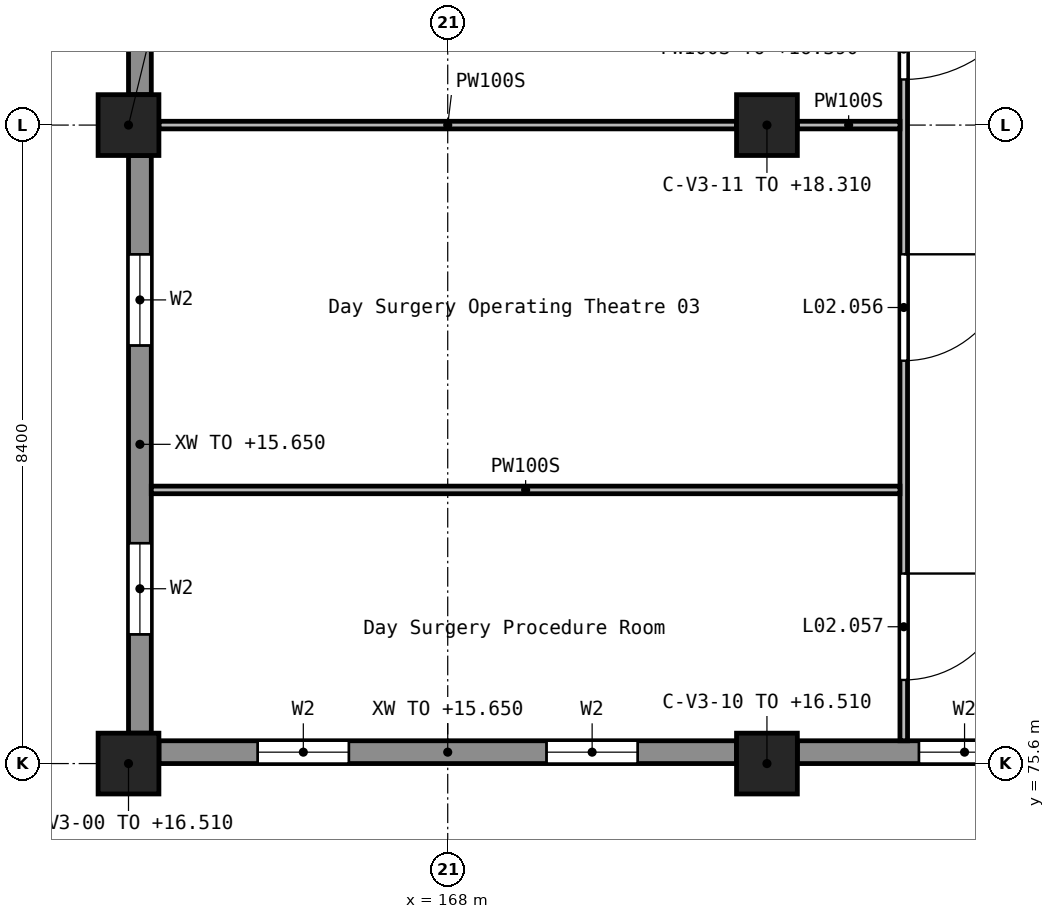
"""IFC4 building model, lengths in metres.
Left out: names, types, materials, properties, quantities, classifications, styles, units other than length and angle.
Written with IfcOpenShell. Run it as: python <this file> out.ifc"""

import sys

from ifc_helpers import new_model, si_unit, direction, frame, frame_2d, origin, origin_2d, place, context, subcontext, project, spatial, rectangle, extrude, element, fill, save


model = new_model("IFC4")
c1 = context("Model", 3, precision=1e-05, world=origin(), true_north=direction((0.0, 1.0)))
c2 = subcontext(c1, "Body", "Model", "MODEL_VIEW")
j1 = project(units=[si_unit("LENGTHUNIT", "METRE"), si_unit("PLANEANGLEUNIT", "RADIAN")], contexts=[c1])
p1 = place(None, origin())
s1 = spatial("IfcSite", under=j1, at=p1, CompositionType="ELEMENT")
p2 = place(p1, origin())
s2 = spatial("IfcBuilding", under=s1, at=p2, CompositionType="ELEMENT")
p3 = place(p2, frame((0.0, 0.0, 12.6)))
s3 = spatial("IfcBuildingStorey", under=s2, at=p3, CompositionType="ELEMENT", Elevation=12.6)
p4 = place(p3, frame((163.8, 75.6, 0.0), z_axis=(0.0, 0.0, 1.0), x_axis=(1.0, 0.0, 0.0)))
e1 = element("IfcColumn", 1, at=p4, inside=s3, PredefinedType="COLUMN", context=c2, shape_type="SweptSolid", body=[
    extrude(rectangle(XDim=0.8, YDim=0.8, at=origin_2d()), origin(), (0.0, 0.0, 1.0), 3.91),
])
p5 = place(p3, frame((163.8, 84.0, 0.0), z_axis=(0.0, 0.0, 1.0), x_axis=(1.0, 0.0, 0.0)))
e2 = element("IfcColumn", 2, at=p5, inside=s3, PredefinedType="COLUMN", context=c2, shape_type="SweptSolid", body=[
    extrude(rectangle(XDim=0.8, YDim=0.8, at=origin_2d()), origin(), (0.0, 0.0, 1.0), 5.71),
])
p6 = place(p3, frame((172.2, 75.6, 0.0), z_axis=(0.0, 0.0, 1.0), x_axis=(1.0, 0.0, 0.0)))
e3 = element("IfcColumn", 3, at=p6, inside=s3, PredefinedType="COLUMN", context=c2, shape_type="SweptSolid", body=[
    extrude(rectangle(XDim=0.8, YDim=0.8, at=origin_2d()), origin(), (0.0, 0.0, 1.0), 3.91),
])
p7 = place(p3, frame((172.2, 84.0, 0.0), z_axis=(0.0, 0.0, 1.0), x_axis=(1.0, 0.0, 0.0)))
e4 = element("IfcColumn", 4, at=p7, inside=s3, PredefinedType="COLUMN", context=c2, shape_type="SweptSolid", body=[
    extrude(rectangle(XDim=0.8, YDim=0.8, at=origin_2d()), origin(), (0.0, 0.0, 1.0), 5.71),
])
p8 = place(p3, frame((163.95, 92.0, 0.0), z_axis=(0.0, 0.0, 1.0), x_axis=(0.0, -1.0, 0.0)))
e5 = element("IfcWall", 5, at=p8, inside=s3, PredefinedType="STANDARD", context=c2, shape_type="SweptSolid", body=[
    extrude(rectangle(XDim=7.6, YDim=0.3, at=frame_2d((3.8, 0.0))), origin(), (0.0, 0.0, 1.0), 3.05),
])
p9 = place(p8, frame((1.3, 0.0, 1.2)))
e6 = element("IfcOpeningElement", 6, at=p9, cuts=e5, PredefinedType="OPENING", context=c2, shape_type="SweptSolid", body=[
    extrude(rectangle(XDim=1.2, YDim=1.2, at=frame_2d((0.6, 0.6))), frame((0.0, 0.16, 0.0), z_axis=(0.0, -1.0, 0.0), x_axis=(1.0, 0.0, 0.0)), (0.0, 0.0, 1.0), 0.32),
])
p10 = place(p8, frame((5.1, 0.0, 1.2)))
e7 = element("IfcOpeningElement", 7, at=p10, cuts=e5, PredefinedType="OPENING", context=c2, shape_type="SweptSolid", body=[
    extrude(rectangle(XDim=1.2, YDim=1.2, at=frame_2d((0.6, 0.6))), frame((0.0, 0.16, 0.0), z_axis=(0.0, -1.0, 0.0), x_axis=(1.0, 0.0, 0.0)), (0.0, 0.0, 1.0), 0.32),
])
p11 = place(p3, frame((163.95, 83.6, 0.0), z_axis=(0.0, 0.0, 1.0), x_axis=(0.0, -1.0, 0.0)))
e8 = element("IfcWall", 8, at=p11, inside=s3, PredefinedType="STANDARD", context=c2, shape_type="SweptSolid", body=[
    extrude(rectangle(XDim=7.6, YDim=0.3, at=frame_2d((3.8, 0.0))), origin(), (0.0, 0.0, 1.0), 3.05),
])
p12 = place(p11, frame((1.3, 0.0, 1.2)))
e9 = element("IfcOpeningElement", 9, at=p12, cuts=e8, PredefinedType="OPENING", context=c2, shape_type="SweptSolid", body=[
    extrude(rectangle(XDim=1.2, YDim=1.2, at=frame_2d((0.6, 0.6))), frame((0.0, 0.16, 0.0), z_axis=(0.0, -1.0, 0.0), x_axis=(1.0, 0.0, 0.0)), (0.0, 0.0, 1.0), 0.32),
])
p13 = place(p11, frame((5.1, 0.0, 1.2)))
e10 = element("IfcOpeningElement", 10, at=p13, cuts=e8, PredefinedType="OPENING", context=c2, shape_type="SweptSolid", body=[
    extrude(rectangle(XDim=1.2, YDim=1.2, at=frame_2d((0.6, 0.6))), frame((0.0, 0.16, 0.0), z_axis=(0.0, -1.0, 0.0), x_axis=(1.0, 0.0, 0.0)), (0.0, 0.0, 1.0), 0.32),
])
p14 = place(p3, frame((164.2, 75.75, 0.0), z_axis=(0.0, 0.0, 1.0), x_axis=(1.0, 0.0, 0.0)))
e11 = element("IfcWall", 11, at=p14, inside=s3, PredefinedType="STANDARD", context=c2, shape_type="SweptSolid", body=[
    extrude(rectangle(XDim=7.6, YDim=0.3, at=frame_2d((3.8, 0.0))), origin(), (0.0, 0.0, 1.0), 3.05),
])
p15 = place(p14, frame((1.3, 0.0, 1.2)))
e12 = element("IfcOpeningElement", 12, at=p15, cuts=e11, PredefinedType="OPENING", context=c2, shape_type="SweptSolid", body=[
    extrude(rectangle(XDim=1.2, YDim=1.2, at=frame_2d((0.6, 0.6))), frame((0.0, 0.16, 0.0), z_axis=(0.0, -1.0, 0.0), x_axis=(1.0, 0.0, 0.0)), (0.0, 0.0, 1.0), 0.32),
])
p16 = place(p14, frame((5.1, 0.0, 1.2)))
e13 = element("IfcOpeningElement", 13, at=p16, cuts=e11, PredefinedType="OPENING", context=c2, shape_type="SweptSolid", body=[
    extrude(rectangle(XDim=1.2, YDim=1.2, at=frame_2d((0.6, 0.6))), frame((0.0, 0.16, 0.0), z_axis=(0.0, -1.0, 0.0), x_axis=(1.0, 0.0, 0.0)), (0.0, 0.0, 1.0), 0.32),
])
p17 = place(p3, frame((172.6, 75.75, 0.0), z_axis=(0.0, 0.0, 1.0), x_axis=(1.0, 0.0, 0.0)))
e14 = element("IfcWall", 14, at=p17, inside=s3, PredefinedType="STANDARD", context=c2, shape_type="SweptSolid", body=[
    extrude(rectangle(XDim=7.6, YDim=0.3, at=frame_2d((3.8, 0.0))), origin(), (0.0, 0.0, 1.0), 3.05),
])
p18 = place(p17, frame((1.6, 0.0, 1.2)))
e15 = element("IfcOpeningElement", 15, at=p18, cuts=e14, PredefinedType="OPENING", context=c2, shape_type="SweptSolid", body=[
    extrude(rectangle(XDim=1.2, YDim=1.2, at=frame_2d((0.6, 0.6))), frame((0.0, 0.16, 0.0), z_axis=(0.0, -1.0, 0.0), x_axis=(1.0, 0.0, 0.0)), (0.0, 0.0, 1.0), 0.32),
])
p19 = place(p17, frame((5.1, 0.0, 1.2)))
e16 = element("IfcOpeningElement", 16, at=p19, cuts=e14, PredefinedType="OPENING", context=c2, shape_type="SweptSolid", body=[
    extrude(rectangle(XDim=1.2, YDim=1.2, at=frame_2d((0.6, 0.6))), frame((0.0, 0.16, 0.0), z_axis=(0.0, -1.0, 0.0), x_axis=(1.0, 0.0, 0.0)), (0.0, 0.0, 1.0), 0.32),
])
p20 = place(p3, frame((174.0, 94.1, 0.0), z_axis=(0.0, 0.0, 1.0), x_axis=(0.0, -1.0, 0.0)))
e17 = element("IfcWall", 17, at=p20, inside=s3, PredefinedType="PARTITIONING", context=c2, shape_type="SweptSolid", body=[
    extrude(rectangle(XDim=18.2, YDim=0.1, at=frame_2d((9.1, 0.0))), origin(), (0.0, 0.0, 1.0), 3.79),
])
p21 = place(p20, frame((0.1, 0.0, 0.0)))
e18 = element("IfcOpeningElement", 18, at=p21, cuts=e17, PredefinedType="OPENING", context=c2, shape_type="SweptSolid", body=[
    extrude(rectangle(XDim=1.4, YDim=2.1, at=frame_2d((0.7, 1.05))), frame((0.0, 0.06, 0.0), z_axis=(0.0, -1.0, 0.0), x_axis=(1.0, 0.0, 0.0)), (0.0, 0.0, 1.0), 0.12),
])
p22 = place(p20, frame((3.7, 0.0, 0.0)))
e19 = element("IfcOpeningElement", 19, at=p22, cuts=e17, PredefinedType="OPENING", context=c2, shape_type="SweptSolid", body=[
    extrude(rectangle(XDim=1.4, YDim=2.1, at=frame_2d((0.7, 1.05))), frame((0.0, 0.06, 0.0), z_axis=(0.0, -1.0, 0.0), x_axis=(1.0, 0.0, 0.0)), (0.0, 0.0, 1.0), 0.12),
])
p23 = place(p20, frame((7.7, 0.0, 0.0)))
e20 = element("IfcOpeningElement", 20, at=p23, cuts=e17, PredefinedType="OPENING", context=c2, shape_type="SweptSolid", body=[
    extrude(rectangle(XDim=1.8, YDim=2.1, at=frame_2d((0.9, 1.05))), frame((0.0, 0.06, 0.0), z_axis=(0.0, -1.0, 0.0), x_axis=(1.0, 0.0, 0.0)), (0.0, 0.0, 1.0), 0.12),
])
p24 = place(p20, frame((11.8, 0.0, 0.0)))
e21 = element("IfcOpeningElement", 21, at=p24, cuts=e17, PredefinedType="OPENING", context=c2, shape_type="SweptSolid", body=[
    extrude(rectangle(XDim=1.4, YDim=2.1, at=frame_2d((0.7, 1.05))), frame((0.0, 0.06, 0.0), z_axis=(0.0, -1.0, 0.0), x_axis=(1.0, 0.0, 0.0)), (0.0, 0.0, 1.0), 0.12),
])
p25 = place(p20, frame((16.0, 0.0, 0.0)))
e22 = element("IfcOpeningElement", 22, at=p25, cuts=e17, PredefinedType="OPENING", context=c2, shape_type="SweptSolid", body=[
    extrude(rectangle(XDim=1.4, YDim=2.1, at=frame_2d((0.7, 1.05))), frame((0.0, 0.06, 0.0), z_axis=(0.0, -1.0, 0.0), x_axis=(1.0, 0.0, 0.0)), (0.0, 0.0, 1.0), 0.12),
])
p26 = place(p3, frame((164.1, 79.2, 0.0), z_axis=(0.0, 0.0, 1.0), x_axis=(1.0, 0.0, 0.0)))
e23 = element("IfcWall", 23, at=p26, inside=s3, PredefinedType="PARTITIONING", context=c2, shape_type="SweptSolid", body=[
    extrude(rectangle(XDim=9.85, YDim=0.1, at=frame_2d((4.925, 0.0))), origin(), (0.0, 0.0, 1.0), 3.85),
])
p27 = place(p3, frame((164.2, 84.0, 0.0), z_axis=(0.0, 0.0, 1.0), x_axis=(1.0, 0.0, 0.0)))
e24 = element("IfcWall", 24, at=p27, inside=s3, PredefinedType="PARTITIONING", context=c2, shape_type="SweptSolid", body=[
    extrude(rectangle(XDim=7.6, YDim=0.1, at=frame_2d((3.8, 0.0))), origin(), (0.0, 0.0, 1.0), 3.85),
])
p28 = place(p3, frame((172.6, 84.0, 0.0), z_axis=(0.0, 0.0, 1.0), x_axis=(1.0, 0.0, 0.0)))
e25 = element("IfcWall", 25, at=p28, inside=s3, PredefinedType="PARTITIONING", context=c2, shape_type="SweptSolid", body=[
    extrude(rectangle(XDim=1.35, YDim=0.1, at=frame_2d((0.675, 0.0))), origin(), (0.0, 0.0, 1.0), 3.85),
])
p29 = place(p12, origin())
e26 = element("IfcWindow", 26, at=p29, inside=s3, PartitioningType="SINGLE_PANEL", PredefinedType="WINDOW", context=c2, shape_type="SweptSolid", body=[
    extrude(rectangle(XDim=1.2, YDim=1.2, at=frame_2d((0.6, 0.6))), frame((0.0, 0.03, 0.0), z_axis=(0.0, -1.0, 0.0), x_axis=(1.0, 0.0, 0.0)), (0.0, 0.0, 1.0), 0.06),
])
fill(e9, e26)
p30 = place(p13, origin())
e27 = element("IfcWindow", 27, at=p30, inside=s3, PartitioningType="SINGLE_PANEL", PredefinedType="WINDOW", context=c2, shape_type="SweptSolid", body=[
    extrude(rectangle(XDim=1.2, YDim=1.2, at=frame_2d((0.6, 0.6))), frame((0.0, 0.03, 0.0), z_axis=(0.0, -1.0, 0.0), x_axis=(1.0, 0.0, 0.0)), (0.0, 0.0, 1.0), 0.06),
])
fill(e10, e27)
p31 = place(p15, origin())
e28 = element("IfcWindow", 28, at=p31, inside=s3, PartitioningType="SINGLE_PANEL", PredefinedType="WINDOW", context=c2, shape_type="SweptSolid", body=[
    extrude(rectangle(XDim=1.2, YDim=1.2, at=frame_2d((0.6, 0.6))), frame((0.0, 0.03, 0.0), z_axis=(0.0, -1.0, 0.0), x_axis=(1.0, 0.0, 0.0)), (0.0, 0.0, 1.0), 0.06),
])
fill(e12, e28)
p32 = place(p16, origin())
e29 = element("IfcWindow", 29, at=p32, inside=s3, PartitioningType="SINGLE_PANEL", PredefinedType="WINDOW", context=c2, shape_type="SweptSolid", body=[
    extrude(rectangle(XDim=1.2, YDim=1.2, at=frame_2d((0.6, 0.6))), frame((0.0, 0.03, 0.0), z_axis=(0.0, -1.0, 0.0), x_axis=(1.0, 0.0, 0.0)), (0.0, 0.0, 1.0), 0.06),
])
fill(e13, e29)
p33 = place(p18, origin())
e30 = element("IfcWindow", 30, at=p33, inside=s3, PartitioningType="SINGLE_PANEL", PredefinedType="WINDOW", context=c2, shape_type="SweptSolid", body=[
    extrude(rectangle(XDim=1.2, YDim=1.2, at=frame_2d((0.6, 0.6))), frame((0.0, 0.03, 0.0), z_axis=(0.0, -1.0, 0.0), x_axis=(1.0, 0.0, 0.0)), (0.0, 0.0, 1.0), 0.06),
])
fill(e15, e30)
p34 = place(p23, frame((1.8, 0.0, 0.0), z_axis=(0.0, 0.0, 1.0), x_axis=(-1.0, 0.0, 0.0)))
e31 = element("IfcDoor", 31, at=p34, inside=s3, OperationType="DOUBLE_DOOR_SINGLE_SWING", PredefinedType="DOOR", context=c2, shape_type="SweptSolid", body=[
    extrude(rectangle(XDim=1.8, YDim=2.1, at=frame_2d((0.9, 1.05))), frame((0.0, 0.025, 0.0), z_axis=(0.0, -1.0, 0.0), x_axis=(1.0, 0.0, 0.0)), (0.0, 0.0, 1.0), 0.05),
])
fill(e20, e31)
p35 = place(p24, frame((1.4, 0.0, 0.0), z_axis=(0.0, 0.0, 1.0), x_axis=(-1.0, 0.0, 0.0)))
e32 = element("IfcDoor", 32, at=p35, inside=s3, OperationType="DOUBLE_DOOR_SINGLE_SWING", PredefinedType="DOOR", context=c2, shape_type="SweptSolid", body=[
    extrude(rectangle(XDim=1.4, YDim=2.1, at=frame_2d((0.7, 1.05))), frame((0.0, 0.025, 0.0), z_axis=(0.0, -1.0, 0.0), x_axis=(1.0, 0.0, 0.0)), (0.0, 0.0, 1.0), 0.05),
])
fill(e21, e32)
p36 = place(p25, frame((1.4, 0.0, 0.0), z_axis=(0.0, 0.0, 1.0), x_axis=(-1.0, 0.0, 0.0)))
e33 = element("IfcDoor", 33, at=p36, inside=s3, OperationType="DOUBLE_DOOR_SINGLE_SWING", PredefinedType="DOOR", context=c2, shape_type="SweptSolid", body=[
    extrude(rectangle(XDim=1.4, YDim=2.1, at=frame_2d((0.7, 1.05))), frame((0.0, 0.025, 0.0), z_axis=(0.0, -1.0, 0.0), x_axis=(1.0, 0.0, 0.0)), (0.0, 0.0, 1.0), 0.05),
])
fill(e22, e33)
save(model, sys.argv[1])
